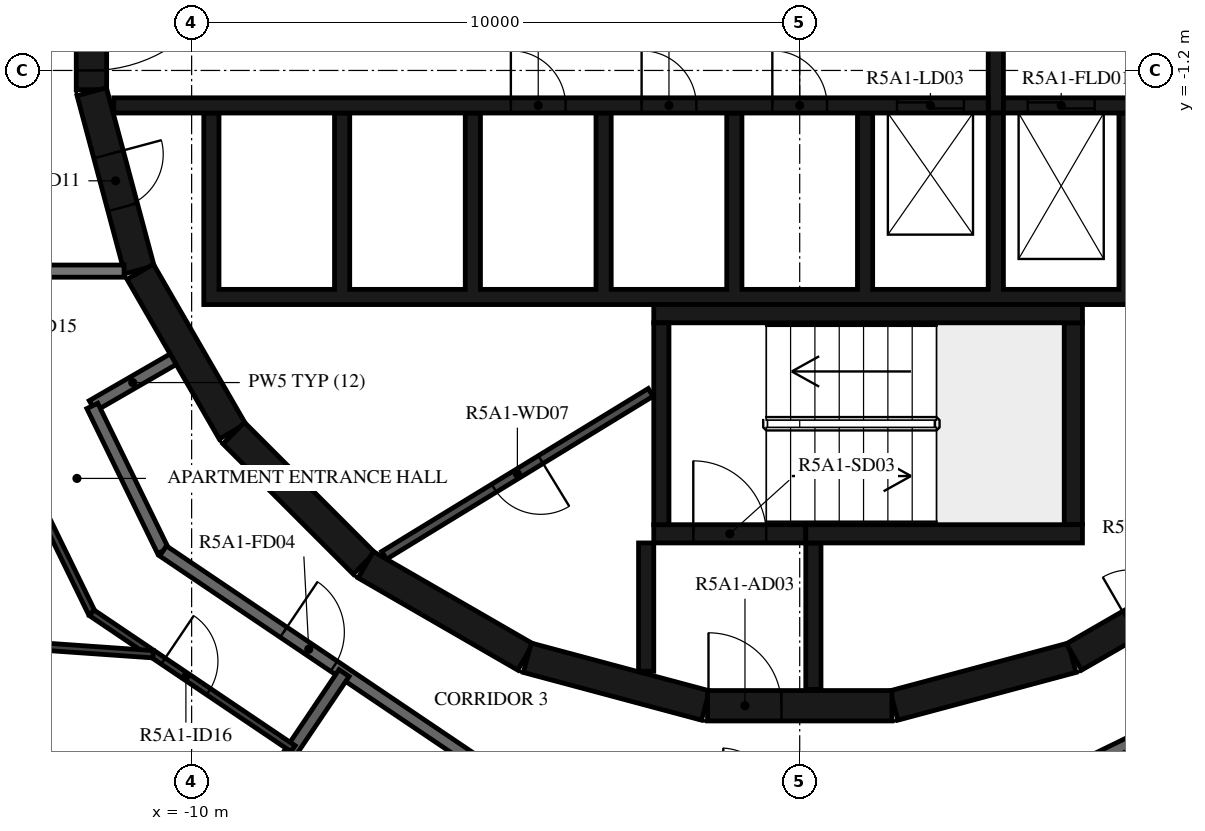
"""IFC4 building model, lengths in metres.
Left out: names, types, materials, properties, quantities, classifications, styles, units other than length and angle.
Written with IfcOpenShell. Run it as: python <this file> out.ifc"""

import sys

from ifc_helpers import new_model, si_unit, direction, frame, frame_2d, origin, place, context, subcontext, project, spatial, polyline, rectangle, outline, extrude, element, fill, save


model = new_model("IFC4")
c1 = context("Model", 3, precision=1e-05, world=origin(), true_north=direction((0.0, 1.0)))
c2 = subcontext(c1, "Body", "Model", "MODEL_VIEW")
j1 = project(units=[si_unit("LENGTHUNIT", "METRE"), si_unit("PLANEANGLEUNIT", "RADIAN")], contexts=[c1])
p1 = place(None, origin())
s1 = spatial("IfcSite", under=j1, at=p1, CompositionType="ELEMENT")
p2 = place(p1, origin())
s2 = spatial("IfcBuilding", under=s1, at=p2, CompositionType="ELEMENT")
p3 = place(p2, frame((0.0, 0.0, 191.9)))
s3 = spatial("IfcBuildingStorey", under=s2, at=p3, CompositionType="ELEMENT", Elevation=191.9)
p4 = place(p3, frame((1.55, -11.643, 0.0), z_axis=(0.0, 0.0, 1.0), x_axis=(0.965948410781, 0.258734743916, 0.0)))
e1 = element("IfcWall", 1, at=p4, inside=s3, PredefinedType="SHEAR", context=c2, shape_type="SweptSolid", body=[
    extrude(rectangle(XDim=3.033, YDim=0.5, at=frame_2d((1.516, 0.0))), origin(), (0.0, 0.0, 1.0), 3.12),
])
p5 = place(p3, frame((4.51, -10.845, 0.0), z_axis=(0.0, 0.0, 1.0), x_axis=(0.865975092491, 0.500087131594, 0.0)))
e2 = element("IfcWall", 2, at=p5, inside=s3, PredefinedType="SHEAR", context=c2, shape_type="SweptSolid", body=[
    extrude(rectangle(XDim=3.033, YDim=0.5, at=frame_2d((1.516, 0.0))), origin(), (0.0, 0.0, 1.0), 3.12),
])
p6 = place(p5, frame((1.066, 0.0, 0.0)))
e3 = element("IfcOpeningElement", 3, at=p6, cuts=e2, PredefinedType="OPENING", context=c2, shape_type="SweptSolid", body=[
    extrude(rectangle(XDim=0.9, YDim=2.1, at=frame_2d((0.45, 1.05))), frame((0.0, 0.26, 0.0), z_axis=(0.0, -1.0, 0.0), x_axis=(1.0, 0.0, 0.0)), (0.0, 0.0, 1.0), 0.52),
])
p7 = place(p3, frame((-11.647, 1.516, 0.0), z_axis=(0.0, 0.0, 1.0), x_axis=(0.0, -1.0, 0.0)))
e4 = element("IfcWall", 4, at=p7, inside=s3, PredefinedType="SHEAR", context=c2, shape_type="SweptSolid", body=[
    extrude(rectangle(XDim=3.033, YDim=0.5, at=frame_2d((1.516, 0.0))), origin(), (0.0, 0.0, 1.0), 3.12),
])
p8 = place(p7, frame((0.316, 0.0, 0.0)))
e5 = element("IfcOpeningElement", 5, at=p8, cuts=e4, PredefinedType="OPENING", context=c2, shape_type="SweptSolid", body=[
    extrude(rectangle(XDim=2.4, YDim=2.1, at=frame_2d((1.2, 1.05))), frame((0.0, 0.26, 0.0), z_axis=(0.0, -1.0, 0.0), x_axis=(1.0, 0.0, 0.0)), (0.0, 0.0, 1.0), 0.52),
])
p9 = place(p3, frame((-11.643, -1.55, 0.0), z_axis=(0.0, 0.0, 1.0), x_axis=(0.258734743916, -0.965948410781, 0.0)))
e6 = element("IfcWall", 6, at=p9, inside=s3, PredefinedType="SHEAR", context=c2, shape_type="SweptSolid", body=[
    extrude(rectangle(XDim=3.033, YDim=0.5, at=frame_2d((1.516, 0.0))), origin(), (0.0, 0.0, 1.0), 3.12),
])
p10 = place(p9, frame((1.066, 0.0, 0.0)))
e7 = element("IfcOpeningElement", 7, at=p10, cuts=e6, PredefinedType="OPENING", context=c2, shape_type="SweptSolid", body=[
    extrude(rectangle(XDim=0.9, YDim=2.1, at=frame_2d((0.45, 1.05))), frame((0.0, 0.26, 0.0), z_axis=(0.0, -1.0, 0.0), x_axis=(1.0, 0.0, 0.0)), (0.0, 0.0, 1.0), 0.52),
])
p11 = place(p3, frame((-10.845, -4.51, 0.0), z_axis=(0.0, 0.0, 1.0), x_axis=(0.500087131594, -0.865975092491, 0.0)))
e8 = element("IfcWall", 8, at=p11, inside=s3, PredefinedType="SHEAR", context=c2, shape_type="SweptSolid", body=[
    extrude(rectangle(XDim=3.033, YDim=0.5, at=frame_2d((1.516, 0.0))), origin(), (0.0, 0.0, 1.0), 3.12),
])
p12 = place(p3, frame((-9.308, -7.164, 0.0), z_axis=(0.0, 0.0, 1.0), x_axis=(0.707106781187, -0.707106781187, 0.0)))
e9 = element("IfcWall", 9, at=p12, inside=s3, PredefinedType="SHEAR", context=c2, shape_type="SweptSolid", body=[
    extrude(rectangle(XDim=3.032, YDim=0.5, at=frame_2d((1.516, 0.0))), origin(), (0.0, 0.0, 1.0), 3.12),
])
for number, where, z_axis, x_axis in (
    (10, (-7.137, -9.329, 0.0), (0.0, 0.0, 1.0), (0.866, -0.5, 0.0)),
    (11, (-4.479, -10.858, 0.0), (0.0, 0.0, 1.0), (0.966, -0.259, 0.0)),
):
    element("IfcWall", number, at=place(p3, frame(where, z_axis=z_axis, x_axis=x_axis)), inside=s3, PredefinedType="SHEAR", context=c2, shape_type="SweptSolid", body=[
        extrude(rectangle(XDim=3.033, YDim=0.5, at=frame_2d((1.516, 0.0))), origin(), (0.0, 0.0, 1.0), 3.12),
    ])
p13 = place(p3, frame((-1.516, -11.647, 0.0), z_axis=(0.0, 0.0, 1.0), x_axis=(1.0, 0.0, 0.0)))
e12 = element("IfcWall", 12, at=p13, inside=s3, PredefinedType="SHEAR", context=c2, shape_type="SweptSolid", body=[
    extrude(rectangle(XDim=3.033, YDim=0.5, at=frame_2d((1.516, 0.0))), origin(), (0.0, 0.0, 1.0), 3.12),
])
p14 = place(p13, frame((0.016, 0.0, 0.0)))
e13 = element("IfcOpeningElement", 13, at=p14, cuts=e12, PredefinedType="OPENING", context=c2, shape_type="SweptSolid", body=[
    extrude(rectangle(XDim=1.2, YDim=2.1, at=frame_2d((0.6, 1.05))), frame((0.0, 0.26, 0.0), z_axis=(0.0, -1.0, 0.0), x_axis=(1.0, 0.0, 0.0)), (0.0, 0.0, 1.0), 0.52),
])
p15 = place(p3, frame((-2.275, -8.67, 0.0), z_axis=(0.0, 0.0, 1.0), x_axis=(0.0, 1.0, 0.0)))
e14 = element("IfcWall", 14, at=p15, inside=s3, PredefinedType="SHEAR", context=c2, shape_type="SweptSolid", body=[
    extrude(rectangle(XDim=3.32, YDim=0.25, at=frame_2d((1.66, 0.0))), origin(), (0.0, 0.0, 1.0), 3.12),
])
p16 = place(p3, frame((-2.4, -5.2, 0.0), z_axis=(0.0, 0.0, 1.0), x_axis=(1.0, 0.0, 0.0)))
e15 = element("IfcWall", 15, at=p16, inside=s3, PredefinedType="SHEAR", context=c2, shape_type="SweptSolid", body=[
    extrude(rectangle(XDim=7.05, YDim=0.3, at=frame_2d((3.525, 0.0))), origin(), (0.0, 0.0, 1.0), 3.12),
])
p17 = place(p3, frame((4.5, -8.67, 0.0), z_axis=(0.0, 0.0, 1.0), x_axis=(0.0, 1.0, 0.0)))
e16 = element("IfcWall", 16, at=p17, inside=s3, PredefinedType="SHEAR", context=c2, shape_type="SweptSolid", body=[
    extrude(rectangle(XDim=3.32, YDim=0.3, at=frame_2d((1.66, 0.0))), origin(), (0.0, 0.0, 1.0), 3.12),
])
p18 = place(p3, frame((0.1, -8.82, 0.0), z_axis=(0.0, 0.0, 1.0), x_axis=(1.0, 0.0, 0.0)))
e17 = element("IfcWall", 17, at=p18, inside=s3, PredefinedType="SHEAR", context=c2, shape_type="SweptSolid", body=[
    extrude(rectangle(XDim=4.55, YDim=0.3, at=frame_2d((2.275, 0.0))), origin(), (0.0, 0.0, 1.0), 3.12),
])
p19 = place(p3, frame((-2.4, -8.82, 0.0), z_axis=(0.0, 0.0, 1.0), x_axis=(1.0, 0.0, 0.0)))
e18 = element("IfcWall", 18, at=p19, inside=s3, PredefinedType="SHEAR", context=c2, shape_type="SweptSolid", body=[
    extrude(rectangle(XDim=2.5, YDim=0.3, at=frame_2d((1.25, 0.0))), origin(), (0.0, 0.0, 1.0), 3.12),
])
p20 = place(p19, frame((0.65, 0.0, 0.0)))
e19 = element("IfcOpeningElement", 19, at=p20, cuts=e18, PredefinedType="OPENING", context=c2, shape_type="SweptSolid", body=[
    extrude(rectangle(XDim=1.2, YDim=2.1, at=frame_2d((0.6, 1.05))), frame((0.0, 0.16, 0.0), z_axis=(0.0, -1.0, 0.0), x_axis=(1.0, 0.0, 0.0)), (0.0, 0.0, 1.0), 0.32),
])
p21 = place(p3, frame((-2.525, -8.97, 0.0), z_axis=(0.0, 0.0, 1.0), x_axis=(0.0, -1.0, 0.0)))
e20 = element("IfcWall", 20, at=p21, inside=s3, PredefinedType="SHEAR", context=c2, shape_type="SweptSolid", body=[
    extrude(rectangle(XDim=2.11, YDim=0.25, at=frame_2d((1.055, 0.0))), origin(), (0.0, 0.0, 1.0), 3.12),
])
p22 = place(p3, frame((0.225, -8.97, 0.0), z_axis=(0.0, 0.0, 1.0), x_axis=(0.0, -1.0, 0.0)))
e21 = element("IfcWall", 21, at=p22, inside=s3, PredefinedType="SHEAR", context=c2, shape_type="SweptSolid", body=[
    extrude(rectangle(XDim=2.41, YDim=0.25, at=frame_2d((1.205, 0.0))), origin(), (0.0, 0.0, 1.0), 3.12),
])
p23 = place(p3, origin())
e22 = element("IfcWall", 22, at=p23, inside=s3, PredefinedType="SHEAR", context=c2, shape_type="SweptSolid", body=[
    extrude(outline(polyline([(9.8, -5.05), (9.8, -4.8), (9.8, -1.9), (9.55, -1.9), (9.55, -4.8), (7.65, -4.8), (7.65, -1.9), (7.4, -1.9), (7.4, -4.8), (5.5, -4.8), (5.5, -1.9), (5.25, -1.9), (5.25, -4.8), (3.35, -4.8), (3.35, -1.9), (3.1, -1.9), (3.1, -4.8), (1.2, -4.8), (1.2, -1.9), (0.95, -1.9), (0.95, -4.8), (-0.95, -4.8), (-0.95, -1.9), (-1.2, -1.9), (-1.2, -4.8), (-3.1, -4.8), (-3.1, -1.9), (-3.35, -1.9), (-3.35, -4.8), (-5.25, -4.8), (-5.25, -1.9), (-5.5, -1.9), (-5.5, -4.8), (-7.4, -4.8), (-7.4, -1.9), (-7.65, -1.9), (-7.65, -4.8), (-9.55, -4.8), (-9.55, -1.9), (-9.8, -1.9), (-9.8, -4.8), (-9.8, -5.05), (9.8, -5.05)])), origin(), (0.0, 0.0, 1.0), 3.12),
])
p24 = place(p3, frame((-11.28, -1.775, 0.0), z_axis=(0.0, 0.0, 1.0), x_axis=(1.0, 0.0, 0.0)))
e23 = element("IfcWall", 23, at=p24, inside=s3, PredefinedType="SHEAR", context=c2, shape_type="SweptSolid", body=[
    extrude(rectangle(XDim=14.38, YDim=0.25, at=frame_2d((7.19, 0.0))), origin(), (0.0, 0.0, 1.0), 3.12),
])
p25 = place(p24, frame((12.88, 0.0, 0.0)))
e24 = element("IfcOpeningElement", 24, at=p25, cuts=e23, PredefinedType="OPENING", context=c2, shape_type="SweptSolid", body=[
    extrude(rectangle(XDim=1.1, YDim=2.1, at=frame_2d((0.55, 1.05))), frame((0.0, 0.135, 0.0), z_axis=(0.0, -1.0, 0.0), x_axis=(1.0, 0.0, 0.0)), (0.0, 0.0, 1.0), 0.27),
])
p26 = place(p24, frame((6.53, 0.0, 0.0)))
e25 = element("IfcOpeningElement", 25, at=p26, cuts=e23, PredefinedType="OPENING", context=c2, shape_type="SweptSolid", body=[
    extrude(rectangle(XDim=0.9, YDim=2.1, at=frame_2d((0.45, 1.05))), frame((0.0, 0.135, 0.0), z_axis=(0.0, -1.0, 0.0), x_axis=(1.0, 0.0, 0.0)), (0.0, 0.0, 1.0), 0.27),
])
p27 = place(p24, frame((8.68, 0.0, 0.0)))
e26 = element("IfcOpeningElement", 26, at=p27, cuts=e23, PredefinedType="OPENING", context=c2, shape_type="SweptSolid", body=[
    extrude(rectangle(XDim=0.9, YDim=2.1, at=frame_2d((0.45, 1.05))), frame((0.0, 0.135, 0.0), z_axis=(0.0, -1.0, 0.0), x_axis=(1.0, 0.0, 0.0)), (0.0, 0.0, 1.0), 0.27),
])
p28 = place(p24, frame((10.83, 0.0, 0.0)))
e27 = element("IfcOpeningElement", 27, at=p28, cuts=e23, PredefinedType="OPENING", context=c2, shape_type="SweptSolid", body=[
    extrude(rectangle(XDim=0.9, YDim=2.1, at=frame_2d((0.45, 1.05))), frame((0.0, 0.135, 0.0), z_axis=(0.0, -1.0, 0.0), x_axis=(1.0, 0.0, 0.0)), (0.0, 0.0, 1.0), 0.27),
])
p29 = place(p3, frame((3.35, -1.775, 0.0), z_axis=(0.0, 0.0, 1.0), x_axis=(1.0, 0.0, 0.0)))
e28 = element("IfcWall", 28, at=p29, inside=s3, PredefinedType="SHEAR", context=c2, shape_type="SweptSolid", body=[
    extrude(rectangle(XDim=7.93, YDim=0.25, at=frame_2d((3.965, 0.0))), origin(), (0.0, 0.0, 1.0), 3.12),
])
p30 = place(p29, frame((0.4, 0.0, 0.0)))
e29 = element("IfcOpeningElement", 29, at=p30, cuts=e28, PredefinedType="OPENING", context=c2, shape_type="SweptSolid", body=[
    extrude(rectangle(XDim=1.1, YDim=2.4, at=frame_2d((0.55, 1.2))), frame((0.0, 0.135, 0.0), z_axis=(0.0, -1.0, 0.0), x_axis=(1.0, 0.0, 0.0)), (0.0, 0.0, 1.0), 0.27),
])
p31 = place(p29, frame((2.55, 0.0, 0.0)))
e30 = element("IfcOpeningElement", 30, at=p31, cuts=e28, PredefinedType="OPENING", context=c2, shape_type="SweptSolid", body=[
    extrude(rectangle(XDim=1.1, YDim=2.4, at=frame_2d((0.55, 1.2))), frame((0.0, 0.135, 0.0), z_axis=(0.0, -1.0, 0.0), x_axis=(1.0, 0.0, 0.0)), (0.0, 0.0, 1.0), 0.27),
])
p32 = place(p29, frame((4.7, 0.0, 0.0)))
e31 = element("IfcOpeningElement", 31, at=p32, cuts=e28, PredefinedType="OPENING", context=c2, shape_type="SweptSolid", body=[
    extrude(rectangle(XDim=1.1, YDim=2.4, at=frame_2d((0.55, 1.2))), frame((0.0, 0.135, 0.0), z_axis=(0.0, -1.0, 0.0), x_axis=(1.0, 0.0, 0.0)), (0.0, 0.0, 1.0), 0.27),
])
p33 = place(p3, frame((3.225, -1.9, 0.0), z_axis=(0.0, 0.0, 1.0), x_axis=(0.0, 1.0, 0.0)))
e32 = element("IfcWall", 32, at=p33, inside=s3, PredefinedType="SHEAR", context=c2, shape_type="SweptSolid", body=[
    extrude(rectangle(XDim=3.8, YDim=0.25, at=frame_2d((1.9, 0.0))), origin(), (0.0, 0.0, 1.0), 3.12),
])
p34 = place(p3, frame((-2.451, -6.495, 0.0), z_axis=(0.0, 0.0, 1.0), x_axis=(-0.853250115418, -0.521501908471, 0.0)))
e33 = element("IfcWall", 33, at=p34, inside=s3, PredefinedType="PARTITIONING", context=c2, shape_type="SweptSolid", body=[
    extrude(rectangle(XDim=5.137, YDim=0.15, at=frame_2d((2.569, 0.0))), origin(), (0.0, 0.0, 1.0), 3.12),
])
p35 = place(p34, frame((2.119, 0.0, 0.0)))
e34 = element("IfcOpeningElement", 34, at=p35, cuts=e33, PredefinedType="OPENING", context=c2, shape_type="SweptSolid", body=[
    extrude(rectangle(XDim=0.9, YDim=2.1, at=frame_2d((0.45, 1.05))), frame((0.0, 0.085, 0.0), z_axis=(0.0, -1.0, 0.0), x_axis=(1.0, 0.0, 0.0)), (0.0, 0.0, 1.0), 0.17),
])
p36 = place(p3, frame((-10.303, -5.949, 0.0), z_axis=(0.0, 0.0, 1.0), x_axis=(-0.866042588199, -0.499970234539, 0.0)))
e35 = element("IfcWall", 35, at=p36, inside=s3, PredefinedType="STANDARD", context=c2, shape_type="SweptSolid", body=[
    extrude(rectangle(XDim=1.535, YDim=0.2, at=frame_2d((0.768, 0.0))), origin(), (0.0, 0.0, 1.0), 3.12),
])
p37 = place(p3, frame((-11.633, -6.716, 0.0), z_axis=(0.0, 0.0, 1.0), x_axis=(0.438322116278, -0.898817958422, 0.0)))
e36 = element("IfcWall", 36, at=p37, inside=s3, PredefinedType="STANDARD", context=c2, shape_type="SweptSolid", body=[
    extrude(rectangle(XDim=2.654, YDim=0.2, at=frame_2d((1.327, 0.0))), origin(), (0.0, 0.0, 1.0), 3.12),
])
p38 = place(p3, frame((-10.47, -9.101, 0.0), z_axis=(0.0, 0.0, 1.0), x_axis=(0.829035841718, -0.559195469534, 0.0)))
e37 = element("IfcWall", 37, at=p38, inside=s3, PredefinedType="STANDARD", context=c2, shape_type="SweptSolid", body=[
    extrude(rectangle(XDim=7.181, YDim=0.2, at=frame_2d((3.591, 0.0))), origin(), (0.0, 0.0, 1.0), 3.12),
])
p39 = place(p38, frame((2.39, 0.0, 0.0)))
e38 = element("IfcOpeningElement", 38, at=p39, cuts=e37, PredefinedType="OPENING", context=c2, shape_type="SweptSolid", body=[
    extrude(rectangle(XDim=1.0, YDim=2.1, at=frame_2d((0.5, 1.05))), frame((0.0, 0.11, 0.0), z_axis=(0.0, -1.0, 0.0), x_axis=(1.0, 0.0, 0.0)), (0.0, 0.0, 1.0), 0.22),
])
p40 = place(p3, frame((2.647, -13.618, 0.0), z_axis=(0.0, 0.0, 1.0), x_axis=(0.898796543751, 0.438366026218, 0.0)))
e39 = element("IfcWall", 39, at=p40, inside=s3, PredefinedType="STANDARD", context=c2, shape_type="SweptSolid", body=[
    extrude(rectangle(XDim=7.181, YDim=0.2, at=frame_2d((3.591, 0.0))), origin(), (0.0, 0.0, 1.0), 3.12),
])
p41 = place(p40, frame((0.2, 0.0, 0.0)))
e40 = element("IfcOpeningElement", 40, at=p41, cuts=e39, PredefinedType="OPENING", context=c2, shape_type="SweptSolid", body=[
    extrude(rectangle(XDim=1.0, YDim=2.1, at=frame_2d((0.5, 1.05))), frame((0.0, 0.11, 0.0), z_axis=(0.0, -1.0, 0.0), x_axis=(1.0, 0.0, 0.0)), (0.0, 0.0, 1.0), 0.22),
])
p42 = place(p3, frame((-17.9, -4.5, 0.0), z_axis=(0.0, 0.0, 1.0), x_axis=(1.0, 0.0, 0.0)))
e41 = element("IfcWall", 41, at=p42, inside=s3, PredefinedType="STANDARD", context=c2, shape_type="SweptSolid", body=[
    extrude(rectangle(XDim=6.789, YDim=0.2, at=frame_2d((3.394, 0.0))), origin(), (0.0, 0.0, 1.0), 3.12),
])
p43 = place(p3, frame((-10.407, -15.43, 0.0), z_axis=(0.0, 0.0, 1.0), x_axis=(0.559038328133, 0.829141813973, 0.0)))
e42 = element("IfcWall", 42, at=p43, inside=s3, PredefinedType="STANDARD", context=c2, shape_type="SweptSolid", body=[
    extrude(rectangle(XDim=5.212, YDim=0.2, at=frame_2d((2.606, 0.0))), origin(), (0.0, 0.0, 1.0), 3.12),
])
p44 = place(p3, frame((-13.715, -5.87, 0.0), z_axis=(0.0, 0.0, 1.0), x_axis=(0.438372766482, -0.89879325632, 0.0)))
e43 = element("IfcWall", 43, at=p44, inside=s3, PredefinedType="PARTITIONING", context=c2, shape_type="SweptSolid", body=[
    extrude(rectangle(XDim=4.728, YDim=0.12, at=frame_2d((2.364, 0.0))), origin(), (0.0, 0.0, 1.0), 3.12),
])
p45 = place(p44, frame((0.4, 0.0, 0.0)))
e44 = element("IfcOpeningElement", 44, at=p45, cuts=e43, PredefinedType="OPENING", context=c2, shape_type="SweptSolid", body=[
    extrude(rectangle(XDim=0.9, YDim=2.1, at=frame_2d((0.45, 1.05))), frame((0.0, 0.07, 0.0), z_axis=(0.0, -1.0, 0.0), x_axis=(1.0, 0.0, 0.0)), (0.0, 0.0, 1.0), 0.14),
])
p46 = place(p3, frame((-11.642, -10.12, 0.0), z_axis=(0.0, 0.0, 1.0), x_axis=(0.829018066952, -0.559221820629, 0.0)))
e45 = element("IfcWall", 45, at=p46, inside=s3, PredefinedType="PARTITIONING", context=c2, shape_type="SweptSolid", body=[
    extrude(rectangle(XDim=3.992, YDim=0.12, at=frame_2d((1.996, 0.0))), origin(), (0.0, 0.0, 1.0), 3.12),
])
p47 = place(p46, frame((1.417, 0.0, 0.0)))
e46 = element("IfcOpeningElement", 46, at=p47, cuts=e45, PredefinedType="OPENING", context=c2, shape_type="SweptSolid", body=[
    extrude(rectangle(XDim=0.9, YDim=2.1, at=frame_2d((0.45, 1.05))), frame((0.0, 0.07, 0.0), z_axis=(0.0, -1.0, 0.0), x_axis=(1.0, 0.0, 0.0)), (0.0, 0.0, 1.0), 0.14),
])
p48 = place(p3, frame((-14.551, -10.527, 0.0), z_axis=(0.0, 0.0, 1.0), x_axis=(0.997564247633, -0.069753651118, 0.0)))
e47 = element("IfcWall", 47, at=p48, inside=s3, PredefinedType="PARTITIONING", context=c2, shape_type="SweptSolid", body=[
    extrude(rectangle(XDim=3.927, YDim=0.12, at=frame_2d((1.963, 0.0))), origin(), (0.0, 0.0, 1.0), 3.12),
])
p49 = place(p3, frame((3.074, -15.078, 0.0), z_axis=(0.0, 0.0, 1.0), x_axis=(0.898800770739, 0.438357359377, 0.0)))
e48 = element("IfcWall", 48, at=p49, inside=s3, PredefinedType="PARTITIONING", context=c2, shape_type="SweptSolid", body=[
    extrude(rectangle(XDim=7.694, YDim=0.12, at=frame_2d((3.847, 0.0))), origin(), (0.0, 0.0, 1.0), 3.12),
])
p50 = place(p49, frame((0.2, 0.0, 0.0)))
e49 = element("IfcOpeningElement", 49, at=p50, cuts=e48, PredefinedType="OPENING", context=c2, shape_type="SweptSolid", body=[
    extrude(rectangle(XDim=0.9, YDim=2.1, at=frame_2d((0.45, 1.05))), frame((0.0, 0.07, 0.0), z_axis=(0.0, -1.0, 0.0), x_axis=(1.0, 0.0, 0.0)), (0.0, 0.0, 1.0), 0.14),
])
p51 = place(p20, origin())
e50 = element("IfcDoor", 50, at=p51, inside=s3, OperationType="SINGLE_SWING_LEFT", PredefinedType="DOOR", context=c2, shape_type="SweptSolid", body=[
    extrude(rectangle(XDim=1.2, YDim=2.1, at=frame_2d((0.6, 1.05))), frame((0.0, 0.025, 0.0), z_axis=(0.0, -1.0, 0.0), x_axis=(1.0, 0.0, 0.0)), (0.0, 0.0, 1.0), 0.05),
])
fill(e19, e50)
p52 = place(p14, origin())
e51 = element("IfcDoor", 51, at=p52, inside=s3, OperationType="SINGLE_SWING_RIGHT", PredefinedType="DOOR", context=c2, shape_type="SweptSolid", body=[
    extrude(rectangle(XDim=1.2, YDim=2.1, at=frame_2d((0.6, 1.05))), frame((0.0, 0.025, 0.0), z_axis=(0.0, -1.0, 0.0), x_axis=(1.0, 0.0, 0.0)), (0.0, 0.0, 1.0), 0.05),
])
fill(e13, e51)
p53 = place(p8, origin())
e52 = element("IfcDoor", 52, at=p53, inside=s3, OperationType="DOUBLE_DOOR_SINGLE_SWING", PredefinedType="DOOR", context=c2, shape_type="SweptSolid", body=[
    extrude(rectangle(XDim=2.4, YDim=2.1, at=frame_2d((1.2, 1.05))), frame((0.0, 0.025, 0.0), z_axis=(0.0, -1.0, 0.0), x_axis=(1.0, 0.0, 0.0)), (0.0, 0.0, 1.0), 0.05),
])
fill(e5, e52)
p54 = place(p25, origin())
e53 = element("IfcDoor", 53, at=p54, inside=s3, OperationType="DOUBLE_DOOR_SLIDING", PredefinedType="DOOR", context=c2, shape_type="SweptSolid", body=[
    extrude(rectangle(XDim=1.1, YDim=2.1, at=frame_2d((0.55, 1.05))), frame((0.0, 0.025, 0.0), z_axis=(0.0, -1.0, 0.0), x_axis=(1.0, 0.0, 0.0)), (0.0, 0.0, 1.0), 0.05),
])
fill(e24, e53)
p55 = place(p30, origin())
e54 = element("IfcDoor", 54, at=p55, inside=s3, OperationType="DOUBLE_DOOR_SLIDING", PredefinedType="DOOR", context=c2, shape_type="SweptSolid", body=[
    extrude(rectangle(XDim=1.1, YDim=2.4, at=frame_2d((0.55, 1.2))), frame((0.0, 0.025, 0.0), z_axis=(0.0, -1.0, 0.0), x_axis=(1.0, 0.0, 0.0)), (0.0, 0.0, 1.0), 0.05),
])
fill(e29, e54)
p56 = place(p26, origin())
e55 = element("IfcDoor", 55, at=p56, inside=s3, OperationType="SINGLE_SWING_RIGHT", PredefinedType="DOOR", context=c2, shape_type="SweptSolid", body=[
    extrude(rectangle(XDim=0.9, YDim=2.1, at=frame_2d((0.45, 1.05))), frame((0.0, 0.025, 0.0), z_axis=(0.0, -1.0, 0.0), x_axis=(1.0, 0.0, 0.0)), (0.0, 0.0, 1.0), 0.05),
])
fill(e25, e55)
p57 = place(p27, origin())
e56 = element("IfcDoor", 56, at=p57, inside=s3, OperationType="SINGLE_SWING_LEFT", PredefinedType="DOOR", context=c2, shape_type="SweptSolid", body=[
    extrude(rectangle(XDim=0.9, YDim=2.1, at=frame_2d((0.45, 1.05))), frame((0.0, 0.025, 0.0), z_axis=(0.0, -1.0, 0.0), x_axis=(1.0, 0.0, 0.0)), (0.0, 0.0, 1.0), 0.05),
])
fill(e26, e56)
p58 = place(p28, origin())
e57 = element("IfcDoor", 57, at=p58, inside=s3, OperationType="SINGLE_SWING_RIGHT", PredefinedType="DOOR", context=c2, shape_type="SweptSolid", body=[
    extrude(rectangle(XDim=0.9, YDim=2.1, at=frame_2d((0.45, 1.05))), frame((0.0, 0.025, 0.0), z_axis=(0.0, -1.0, 0.0), x_axis=(1.0, 0.0, 0.0)), (0.0, 0.0, 1.0), 0.05),
])
fill(e27, e57)
p59 = place(p35, origin())
e58 = element("IfcDoor", 58, at=p59, inside=s3, OperationType="SINGLE_SWING_LEFT", PredefinedType="DOOR", context=c2, shape_type="SweptSolid", body=[
    extrude(rectangle(XDim=0.9, YDim=2.1, at=frame_2d((0.45, 1.05))), frame((0.0, 0.025, 0.0), z_axis=(0.0, -1.0, 0.0), x_axis=(1.0, 0.0, 0.0)), (0.0, 0.0, 1.0), 0.05),
])
fill(e34, e58)
p60 = place(p10, origin())
e59 = element("IfcDoor", 59, at=p60, inside=s3, OperationType="SINGLE_SWING_LEFT", PredefinedType="DOOR", context=c2, shape_type="SweptSolid", body=[
    extrude(rectangle(XDim=0.9, YDim=2.1, at=frame_2d((0.45, 1.05))), frame((0.0, 0.025, 0.0), z_axis=(0.0, -1.0, 0.0), x_axis=(1.0, 0.0, 0.0)), (0.0, 0.0, 1.0), 0.05),
])
fill(e7, e59)
p61 = place(p39, origin())
e60 = element("IfcDoor", 60, at=p61, inside=s3, OperationType="SINGLE_SWING_RIGHT", PredefinedType="DOOR", context=c2, shape_type="SweptSolid", body=[
    extrude(rectangle(XDim=1.0, YDim=2.1, at=frame_2d((0.5, 1.05))), frame((0.0, 0.025, 0.0), z_axis=(0.0, -1.0, 0.0), x_axis=(1.0, 0.0, 0.0)), (0.0, 0.0, 1.0), 0.05),
])
fill(e38, e60)
p62 = place(p47, origin())
e61 = element("IfcDoor", 61, at=p62, inside=s3, OperationType="SINGLE_SWING_RIGHT", PredefinedType="DOOR", context=c2, shape_type="SweptSolid", body=[
    extrude(rectangle(XDim=0.9, YDim=2.1, at=frame_2d((0.45, 1.05))), frame((0.0, 0.025, 0.0), z_axis=(0.0, -1.0, 0.0), x_axis=(1.0, 0.0, 0.0)), (0.0, 0.0, 1.0), 0.05),
])
fill(e46, e61)
save(model, sys.argv[1])
